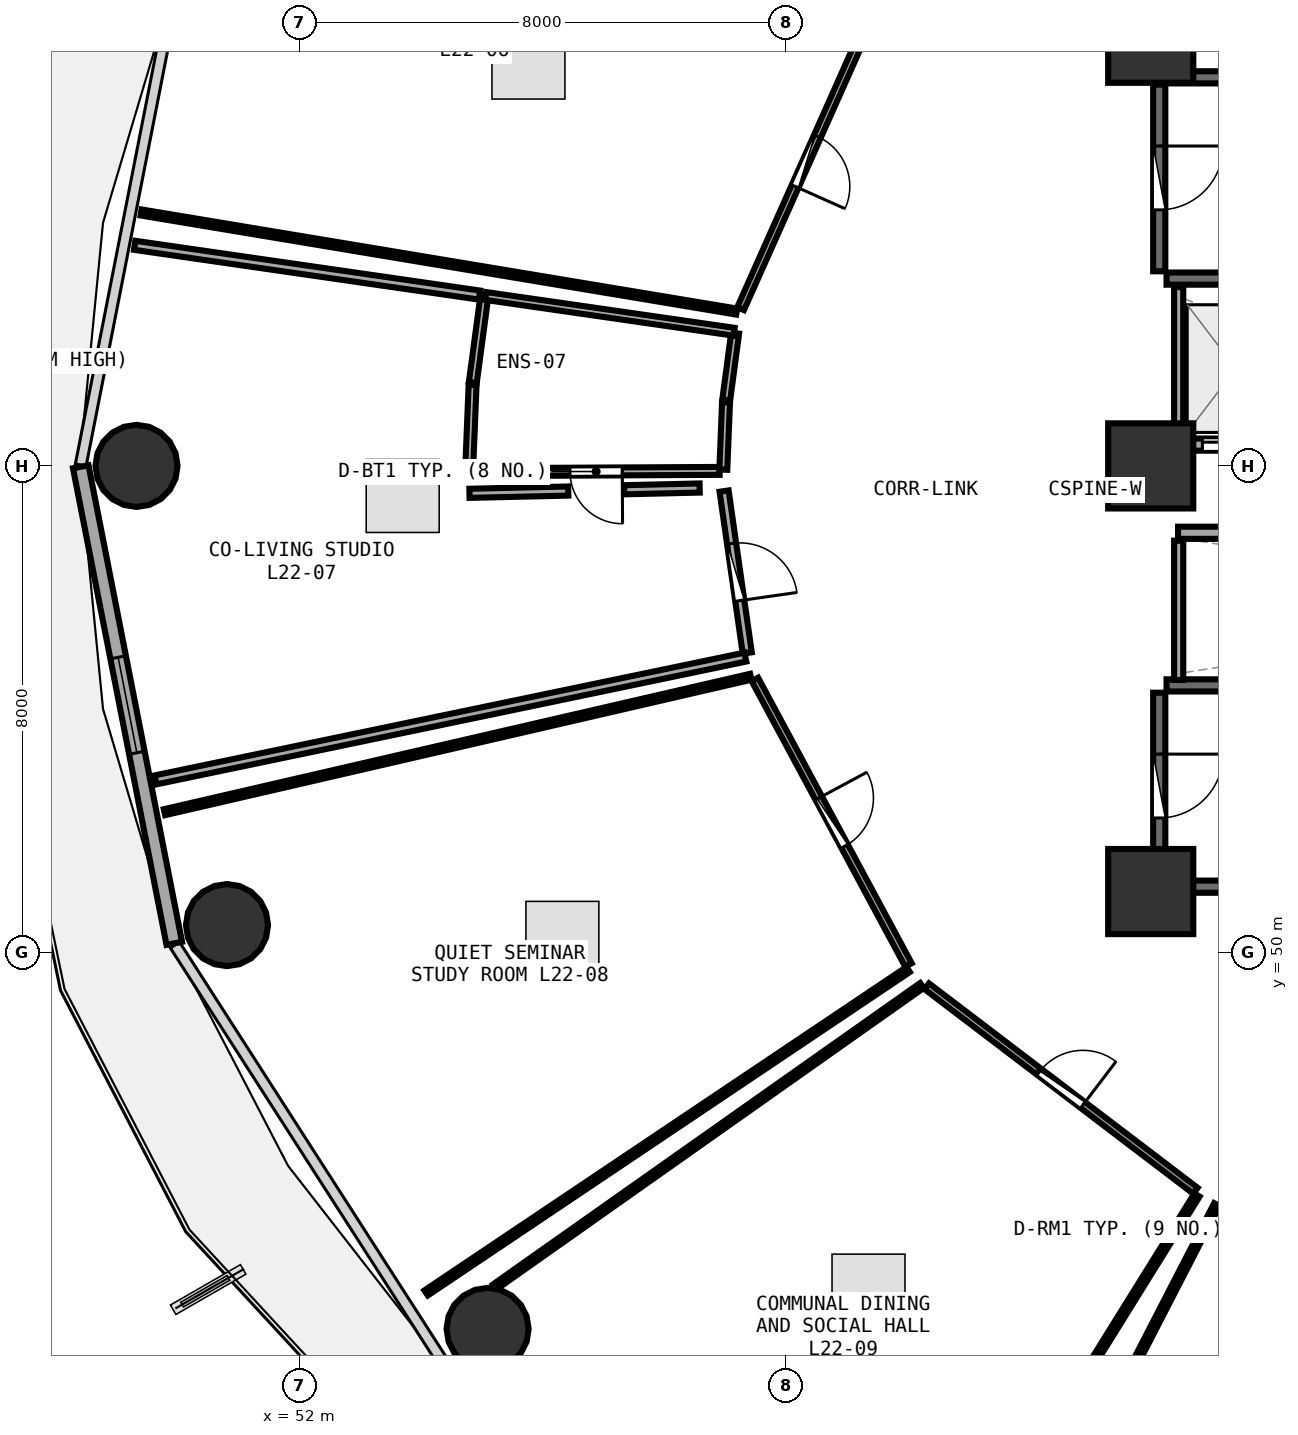
"""IFC4 building model, lengths in metres.
Left out: names, types, materials, properties, quantities, classifications, styles, units other than length and angle.
Written with IfcOpenShell. Run it as: python <this file> out.ifc"""

import sys

from ifc_helpers import new_model, si_unit, direction, frame, frame_2d, origin, origin_2d, place, context, subcontext, project, spatial, rectangle, circle, extrude, element, fill, save


model = new_model("IFC4")
c1 = context("Model", 3, precision=1e-05, world=origin(), true_north=direction((0.0, 1.0)))
c2 = subcontext(c1, "Body", "Model", "MODEL_VIEW")
j1 = project(units=[si_unit("LENGTHUNIT", "METRE"), si_unit("PLANEANGLEUNIT", "RADIAN")], contexts=[c1])
p1 = place(None, origin())
s1 = spatial("IfcSite", under=j1, at=p1, CompositionType="ELEMENT")
p2 = place(p1, origin())
s2 = spatial("IfcBuilding", under=s1, at=p2, CompositionType="ELEMENT")
p3 = place(p2, frame((0.0, 0.0, 87.6)))
s3 = spatial("IfcBuildingStorey", under=s2, at=p3, CompositionType="ELEMENT", Elevation=87.6)
for number, where, z_axis, x_axis in (
    (1, (66.0, 51.0, 0.0), (0.0, 0.0, 1.0), (1.0, 0.0, 0.0)),
    (2, (66.0, 65.0, 0.0), (0.0, 0.0, 1.0), (1.0, 0.0, 0.0)),
    (3, (66.0, 58.0, 0.0), (0.0, 0.0, 1.0), (1.0, 0.0, 0.0)),
):
    element("IfcColumn", number, at=place(p3, frame(where, z_axis=z_axis, x_axis=x_axis)), inside=s3, PredefinedType="PILASTER", context=c2, shape_type="SweptSolid", body=[
        extrude(rectangle(XDim=1.4, YDim=1.4, at=origin_2d()), origin(), (0.0, 0.0, 1.0), 3.75),
    ])
for number, where, z_axis, x_axis in (
    (4, (49.32, 58.0, 0.0), (0.0, 0.0, 1.0), (1.0, 0.0, 0.0)),
    (5, (50.808, 50.448, 0.0), (0.0, 0.0, 1.0), (1.0, 0.0, 0.0)),
    (6, (55.094, 43.807, 0.0), (0.0, 0.0, 1.0), (1.0, 0.0, 0.0)),
):
    element("IfcColumn", number, at=place(p3, frame(where, z_axis=z_axis, x_axis=x_axis)), inside=s3, PredefinedType="COLUMN", context=c2, shape_type="SweptSolid", body=[
        extrude(circle(Radius=0.675, at=origin_2d()), origin(), (0.0, 0.0, 1.0), 3.75),
    ])
p4 = place(p3, frame((48.403, 57.985, 0.0), z_axis=(0.0, 0.0, 1.0), x_axis=(0.192581843632, -0.981280914674, 0.0)))
e7 = element("IfcWall", 7, at=p4, inside=s3, PredefinedType="SOLIDWALL", context=c2, shape_type="SweptSolid", body=[
    extrude(rectangle(XDim=7.987, YDim=0.26, at=frame_2d((3.993, 0.0))), origin(), (0.0, 0.0, 1.0), 3.475),
])
p5 = place(p4, frame((3.193, 0.0, 0.85)))
e8 = element("IfcOpeningElement", 8, at=p5, cuts=e7, PredefinedType="OPENING", context=c2, shape_type="SweptSolid", body=[
    extrude(rectangle(XDim=1.6, YDim=1.45, at=frame_2d((0.8, 0.725))), frame((0.0, 0.14, 0.0), z_axis=(0.0, -1.0, 0.0), x_axis=(1.0, 0.0, 0.0)), (0.0, 0.0, 1.0), 0.28),
])
for number, where, z_axis, x_axis in (
    (9, (66.26, 61.08, 0.0), (0.0, 0.0, 1.0), (1.0, 0.0, 0.0)),
    (10, (73.42, 64.39, 0.0), (0.0, 0.0, 1.0), (-1.0, 0.0, 0.0)),
):
    element("IfcWall", number, at=place(p3, frame(where, z_axis=z_axis, x_axis=x_axis)), inside=s3, PredefinedType="SHEAR", context=c2, shape_type="SweptSolid", body=[
        extrude(rectangle(XDim=7.16, YDim=0.2, at=frame_2d((3.58, 0.0))), origin(), (0.0, 0.0, 1.0), 3.49),
    ])
p6 = place(p3, frame((66.14, 64.27, 0.0), z_axis=(0.0, 0.0, 1.0), x_axis=(0.0, -1.0, 0.0)))
e11 = element("IfcWall", 11, at=p6, inside=s3, PredefinedType="SHEAR", context=c2, shape_type="SweptSolid", body=[
    extrude(rectangle(XDim=3.07, YDim=0.2, at=frame_2d((1.535, 0.0))), origin(), (0.0, 0.0, 1.0), 3.49),
])
p7 = place(p6, frame((1.01, 0.0, 0.0)))
e12 = element("IfcOpeningElement", 12, at=p7, cuts=e11, PredefinedType="OPENING", context=c2, shape_type="SweptSolid", body=[
    extrude(rectangle(XDim=1.05, YDim=2.1, at=frame_2d((0.525, 1.05))), frame((0.0, 0.11, 0.0), z_axis=(0.0, -1.0, 0.0), x_axis=(1.0, 0.0, 0.0)), (0.0, 0.0, 1.0), 0.22),
])
for number, where, z_axis, x_axis in (
    (13, (66.26, 51.08, 0.0), (0.0, 0.0, 1.0), (1.0, 0.0, 0.0)),
    (14, (73.42, 54.39, 0.0), (0.0, 0.0, 1.0), (-1.0, 0.0, 0.0)),
):
    element("IfcWall", number, at=place(p3, frame(where, z_axis=z_axis, x_axis=x_axis)), inside=s3, PredefinedType="SHEAR", context=c2, shape_type="SweptSolid", body=[
        extrude(rectangle(XDim=7.16, YDim=0.2, at=frame_2d((3.58, 0.0))), origin(), (0.0, 0.0, 1.0), 3.49),
    ])
p8 = place(p3, frame((66.14, 54.27, 0.0), z_axis=(0.0, 0.0, 1.0), x_axis=(0.0, -1.0, 0.0)))
e15 = element("IfcWall", 15, at=p8, inside=s3, PredefinedType="SHEAR", context=c2, shape_type="SweptSolid", body=[
    extrude(rectangle(XDim=3.07, YDim=0.2, at=frame_2d((1.535, 0.0))), origin(), (0.0, 0.0, 1.0), 3.49),
])
p9 = place(p8, frame((1.01, 0.0, 0.0)))
e16 = element("IfcOpeningElement", 16, at=p9, cuts=e15, PredefinedType="OPENING", context=c2, shape_type="SweptSolid", body=[
    extrude(rectangle(XDim=1.05, YDim=2.1, at=frame_2d((0.525, 1.05))), frame((0.0, 0.11, 0.0), z_axis=(0.0, -1.0, 0.0), x_axis=(1.0, 0.0, 0.0)), (0.0, 0.0, 1.0), 0.22),
])
p10 = place(p3, frame((66.45, 58.35, 0.0), z_axis=(0.0, 0.0, 1.0), x_axis=(1.0, 0.0, 0.0)))
e17 = element("IfcWall", 17, at=p10, inside=s3, PredefinedType="SOLIDWALL", context=c2, shape_type="SweptSolid", body=[
    extrude(rectangle(XDim=6.0, YDim=0.2, at=frame_2d((3.0, 0.0))), origin(), (0.0, 0.0, 1.0), 3.48),
])
p11 = place(p10, frame((0.4, 0.0, 0.0)))
e18 = element("IfcOpeningElement", 18, at=p11, cuts=e17, PredefinedType="OPENING", context=c2, shape_type="SweptSolid", body=[
    extrude(rectangle(XDim=1.1, YDim=2.1, at=frame_2d((0.55, 1.05))), frame((0.0, 0.11, 0.0), z_axis=(0.0, -1.0, 0.0), x_axis=(1.0, 0.0, 0.0)), (0.0, 0.0, 1.0), 0.22),
])
p12 = place(p10, frame((2.4, 0.0, 0.0)))
e19 = element("IfcOpeningElement", 19, at=p12, cuts=e17, PredefinedType="OPENING", context=c2, shape_type="SweptSolid", body=[
    extrude(rectangle(XDim=1.1, YDim=2.1, at=frame_2d((0.55, 1.05))), frame((0.0, 0.11, 0.0), z_axis=(0.0, -1.0, 0.0), x_axis=(1.0, 0.0, 0.0)), (0.0, 0.0, 1.0), 0.22),
])
p13 = place(p10, frame((4.4, 0.0, 0.0)))
e20 = element("IfcOpeningElement", 20, at=p13, cuts=e17, PredefinedType="OPENING", context=c2, shape_type="SweptSolid", body=[
    extrude(rectangle(XDim=1.1, YDim=2.1, at=frame_2d((0.55, 1.05))), frame((0.0, 0.11, 0.0), z_axis=(0.0, -1.0, 0.0), x_axis=(1.0, 0.0, 0.0)), (0.0, 0.0, 1.0), 0.22),
])
p14 = place(p3, frame((66.46, 58.48, 0.0), z_axis=(0.0, 0.0, 1.0), x_axis=(0.0, 1.0, 0.0)))
e21 = element("IfcWall", 21, at=p14, inside=s3, PredefinedType="PARTITIONING", context=c2, shape_type="SweptSolid", body=[
    extrude(rectangle(XDim=2.46, YDim=0.15, at=frame_2d((1.23, 0.0))), origin(), (0.0, 0.0, 1.0), 3.48),
])
p15 = place(p3, frame((66.45, 56.9, 0.0), z_axis=(0.0, 0.0, 1.0), x_axis=(1.0, 0.0, 0.0)))
e22 = element("IfcWall", 22, at=p15, inside=s3, PredefinedType="SOLIDWALL", context=c2, shape_type="SweptSolid", body=[
    extrude(rectangle(XDim=14.4, YDim=0.2, at=frame_2d((7.2, 0.0))), origin(), (0.0, 0.0, 1.0), 3.48),
])
p16 = place(p3, frame((66.46, 54.48, 0.0), z_axis=(0.0, 0.0, 1.0), x_axis=(0.0, 1.0, 0.0)))
e23 = element("IfcWall", 23, at=p16, inside=s3, PredefinedType="PARTITIONING", context=c2, shape_type="SweptSolid", body=[
    extrude(rectangle(XDim=2.29, YDim=0.15, at=frame_2d((1.145, 0.0))), origin(), (0.0, 0.0, 1.0), 3.48),
])
p17 = place(p3, frame((61.414, 65.428, 0.0), z_axis=(0.0, 0.0, 1.0), x_axis=(-0.407078232177, -0.913393295841, 0.0)))
e24 = element("IfcWall", 24, at=p17, inside=s3, PredefinedType="PARTITIONING", context=c2, shape_type="SweptSolid", body=[
    extrude(rectangle(XDim=5.302, YDim=0.12, at=frame_2d((2.651, 0.0))), origin(), (0.0, 0.0, 1.0), 2.925),
])
p18 = place(p17, frame((2.201, 0.0, 0.0)))
e25 = element("IfcOpeningElement", 25, at=p18, cuts=e24, PredefinedType="OPENING", context=c2, shape_type="SweptSolid", body=[
    extrude(rectangle(XDim=0.9, YDim=2.08, at=frame_2d((0.45, 1.04))), frame((0.0, 0.07, 0.0), z_axis=(0.0, -1.0, 0.0), x_axis=(1.0, 0.0, 0.0)), (0.0, 0.0, 1.0), 0.14),
])
p19 = place(p3, frame((58.91, 57.918, 0.0), z_axis=(0.0, 0.0, 1.0), x_axis=(-0.999986004608, -0.005290613143, 0.0)))
e26 = element("IfcWall", 26, at=p19, inside=s3, PredefinedType="PLUMBINGWALL", context=c2, shape_type="SweptSolid", body=[
    extrude(rectangle(XDim=4.061, YDim=0.13, at=frame_2d((2.03, 0.0))), origin(), (0.0, 0.0, 1.0), 2.925),
])
p20 = place(p19, frame((1.601, 0.0, 0.0)))
e27 = element("IfcOpeningElement", 27, at=p20, cuts=e26, PredefinedType="OPENING", context=c2, shape_type="SweptSolid", body=[
    extrude(rectangle(XDim=0.86, YDim=2.05, at=frame_2d((0.43, 1.025))), frame((0.0, 0.075, 0.0), z_axis=(0.0, -1.0, 0.0), x_axis=(1.0, 0.0, 0.0)), (0.0, 0.0, 1.0), 0.15),
])
p21 = place(p3, frame((58.983, 57.586, 0.0), z_axis=(0.0, 0.0, 1.0), x_axis=(0.141700939895, -0.989909512851, 0.0)))
e28 = element("IfcWall", 28, at=p21, inside=s3, PredefinedType="PARTITIONING", context=c2, shape_type="SweptSolid", body=[
    extrude(rectangle(XDim=2.689, YDim=0.15, at=frame_2d((1.345, 0.0))), origin(), (0.0, 0.0, 1.0), 3.48),
])
p22 = place(p21, frame((0.87, 0.0, 0.0)))
e29 = element("IfcOpeningElement", 29, at=p22, cuts=e28, PredefinedType="OPENING", context=c2, shape_type="SweptSolid", body=[
    extrude(rectangle(XDim=0.95, YDim=2.08, at=frame_2d((0.475, 1.04))), frame((0.0, 0.085, 0.0), z_axis=(0.0, -1.0, 0.0), x_axis=(1.0, 0.0, 0.0)), (0.0, 0.0, 1.0), 0.17),
])
p23 = place(p3, frame((59.49, 54.488, 0.0), z_axis=(0.0, 0.0, 1.0), x_axis=(0.473630069111, -0.880723882743, 0.0)))
e30 = element("IfcWall", 30, at=p23, inside=s3, PredefinedType="PARTITIONING", context=c2, shape_type="SweptSolid", body=[
    extrude(rectangle(XDim=5.332, YDim=0.12, at=frame_2d((2.666, 0.0))), origin(), (0.0, 0.0, 1.0), 2.925),
])
p24 = place(p23, frame((2.216, 0.0, 0.0)))
e31 = element("IfcOpeningElement", 31, at=p24, cuts=e30, PredefinedType="OPENING", context=c2, shape_type="SweptSolid", body=[
    extrude(rectangle(XDim=0.9, YDim=2.08, at=frame_2d((0.45, 1.04))), frame((0.0, 0.07, 0.0), z_axis=(0.0, -1.0, 0.0), x_axis=(1.0, 0.0, 0.0)), (0.0, 0.0, 1.0), 0.14),
])
p25 = place(p3, frame((62.318, 49.442, 0.0), z_axis=(0.0, 0.0, 1.0), x_axis=(0.795762794985, -0.605608432997, 0.0)))
e32 = element("IfcWall", 32, at=p25, inside=s3, PredefinedType="PARTITIONING", context=c2, shape_type="SweptSolid", body=[
    extrude(rectangle(XDim=5.55, YDim=0.12, at=frame_2d((2.775, 0.0))), origin(), (0.0, 0.0, 1.0), 2.925),
])
p26 = place(p25, frame((2.325, 0.0, 0.0)))
e33 = element("IfcOpeningElement", 33, at=p26, cuts=e32, PredefinedType="OPENING", context=c2, shape_type="SweptSolid", body=[
    extrude(rectangle(XDim=0.9, YDim=2.08, at=frame_2d((0.45, 1.04))), frame((0.0, 0.07, 0.0), z_axis=(0.0, -1.0, 0.0), x_axis=(1.0, 0.0, 0.0)), (0.0, 0.0, 1.0), 0.14),
])
p27 = place(p3, frame((59.191, 60.538, 0.0), z_axis=(0.0, 0.0, 1.0), x_axis=(-0.986439069388, 0.16412788424, 0.0)))
e34 = element("IfcWall", 34, at=p27, inside=s3, PredefinedType="PARTITIONING", context=c2, shape_type="SweptSolid", body=[
    extrude(rectangle(XDim=9.931, YDim=0.1, at=frame_2d((4.965, 0.0))), origin(), (0.0, 0.0, 1.0), 2.975),
])
p28 = place(p3, frame((59.165, 60.183, 0.0), z_axis=(0.0, 0.0, 1.0), x_axis=(-0.132293485363, -0.991210590001, 0.0)))
e35 = element("IfcWall", 35, at=p28, inside=s3, PredefinedType="PLUMBINGWALL", context=c2, shape_type="SweptSolid", body=[
    extrude(rectangle(XDim=1.109, YDim=0.13, at=frame_2d((0.555, 0.0))), origin(), (0.0, 0.0, 1.0), 3.48),
])
p29 = place(p3, frame((59.015, 59.044, 0.0), z_axis=(0.0, 0.0, 1.0), x_axis=(-0.040144213929, -0.999193896142, 0.0)))
e36 = element("IfcWall", 36, at=p29, inside=s3, PredefinedType="PLUMBINGWALL", context=c2, shape_type="SweptSolid", body=[
    extrude(rectangle(XDim=1.107, YDim=0.13, at=frame_2d((0.553, 0.0))), origin(), (0.0, 0.0, 1.0), 2.925),
])
p30 = place(p3, frame((54.79, 57.916, 0.0), z_axis=(0.0, 0.0, 1.0), x_axis=(0.040511918217, 0.999179055266, 0.0)))
e37 = element("IfcWall", 37, at=p30, inside=s3, PredefinedType="PLUMBINGWALL", context=c2, shape_type="SweptSolid", body=[
    extrude(rectangle(XDim=1.416, YDim=0.13, at=frame_2d((0.708, 0.0))), origin(), (0.0, 0.0, 1.0), 2.925),
])
p31 = place(p3, frame((54.851, 59.371, 0.0), z_axis=(0.0, 0.0, 1.0), x_axis=(0.133008986947, 0.991114831587, 0.0)))
e38 = element("IfcWall", 38, at=p31, inside=s3, PredefinedType="PLUMBINGWALL", context=c2, shape_type="SweptSolid", body=[
    extrude(rectangle(XDim=1.419, YDim=0.13, at=frame_2d((0.709, 0.0))), origin(), (0.0, 0.0, 1.0), 3.48),
])
p32 = place(p3, frame((55.062, 60.794, 0.0), z_axis=(0.0, 0.0, 1.0), x_axis=(0.989792775484, -0.142514075094, 0.0)))
e39 = element("IfcWall", 39, at=p32, inside=s3, PredefinedType="PLUMBINGWALL", context=c2, shape_type="SweptSolid", body=[
    extrude(rectangle(XDim=4.129, YDim=0.13, at=frame_2d((2.064, 0.0))), origin(), (0.0, 0.0, 1.0), 3.175),
])
p33 = place(p3, frame((59.334, 54.856, 0.0), z_axis=(0.0, 0.0, 1.0), x_axis=(-0.979013610983, -0.203794871157, 0.0)))
e40 = element("IfcWall", 40, at=p33, inside=s3, PredefinedType="PARTITIONING", context=c2, shape_type="SweptSolid", body=[
    extrude(rectangle(XDim=9.91, YDim=0.15, at=frame_2d((4.955, 0.0))), origin(), (0.0, 0.0, 1.0), 2.975),
])
p34 = place(p3, frame((49.29, 61.627, 0.0), z_axis=(0.0, 0.0, 1.0), x_axis=(0.989748303042, -0.142822605444, 0.0)))
e41 = element("IfcWall", 41, at=p34, inside=s3, PredefinedType="PARTITIONING", context=c2, shape_type="SweptSolid", body=[
    extrude(rectangle(XDim=5.732, YDim=0.15, at=frame_2d((2.866, 0.0))), origin(), (0.0, 0.0, 1.0), 2.975),
])
p35 = place(p3, frame((54.796, 57.549, 0.0), z_axis=(0.0, 0.0, 1.0), x_axis=(0.999735829312, 0.022984159562, 0.0)))
e42 = element("IfcWall", 42, at=p35, inside=s3, PredefinedType="PARTITIONING", context=c2, shape_type="SweptSolid", body=[
    extrude(rectangle(XDim=1.625, YDim=0.15, at=frame_2d((0.812, 0.0))), origin(), (0.0, 0.0, 1.0), 3.175),
])
p36 = place(p3, frame((57.341, 57.607, 0.0), z_axis=(0.0, 0.0, 1.0), x_axis=(0.999735089114, 0.02301633322, 0.0)))
e43 = element("IfcWall", 43, at=p36, inside=s3, PredefinedType="PARTITIONING", context=c2, shape_type="SweptSolid", body=[
    extrude(rectangle(XDim=1.241, YDim=0.15, at=frame_2d((0.621, 0.0))), origin(), (0.0, 0.0, 1.0), 3.48),
])
p37 = place(p3, frame((62.011, 49.718, 0.0), z_axis=(0.0, 0.0, 1.0), x_axis=(-0.830433607217, -0.557117603388, 0.0)))
e44 = element("IfcWall", 44, at=p37, inside=s3, PredefinedType="PARTITIONING", context=c2, shape_type="SweptSolid", body=[
    extrude(rectangle(XDim=9.546, YDim=0.1, at=frame_2d((4.773, 0.0))), origin(), (0.0, 0.0, 1.0), 2.975),
])
p38 = place(p3, frame((49.78, 52.305, 0.0), z_axis=(0.0, 0.0, 1.0), x_axis=(0.9743529317, 0.225025252999, 0.0)))
e45 = element("IfcWall", 45, at=p38, inside=s3, PredefinedType="PARTITIONING", context=c2, shape_type="SweptSolid", body=[
    extrude(rectangle(XDim=9.897, YDim=0.1, at=frame_2d((4.948, 0.0))), origin(), (0.0, 0.0, 1.0), 2.975),
])
p39 = place(p3, frame((66.761, 46.01, 0.0), z_axis=(0.0, 0.0, 1.0), x_axis=(-0.528015738644, -0.849234584638, 0.0)))
e46 = element("IfcWall", 46, at=p39, inside=s3, PredefinedType="PARTITIONING", context=c2, shape_type="SweptSolid", body=[
    extrude(rectangle(XDim=8.338, YDim=0.1, at=frame_2d((4.169, 0.0))), origin(), (0.0, 0.0, 1.0), 3.175),
])
p40 = place(p3, frame((55.21, 44.498, 0.0), z_axis=(0.0, 0.0, 1.0), x_axis=(0.817133838915, 0.576447993578, 0.0)))
e47 = element("IfcWall", 47, at=p40, inside=s3, PredefinedType="PARTITIONING", context=c2, shape_type="SweptSolid", body=[
    extrude(rectangle(XDim=8.6, YDim=0.1, at=frame_2d((4.3, 0.0))), origin(), (0.0, 0.0, 1.0), 3.175),
])
p41 = place(p3, frame((65.382, 42.546, 0.0), z_axis=(0.0, 0.0, 1.0), x_axis=(0.458413879464, 0.888738834031, 0.0)))
e48 = element("IfcWall", 48, at=p41, inside=s3, PredefinedType="PARTITIONING", context=c2, shape_type="SweptSolid", body=[
    extrude(rectangle(XDim=3.72, YDim=0.1, at=frame_2d((1.86, 0.0))), origin(), (0.0, 0.0, 1.0), 3.175),
])
p42 = place(p5, origin())
e49 = element("IfcWindow", 49, at=p42, inside=s3, PartitioningType="SINGLE_PANEL", PredefinedType="WINDOW", context=c2, shape_type="SweptSolid", body=[
    extrude(rectangle(XDim=1.6, YDim=1.45, at=frame_2d((0.8, 0.725))), frame((0.0, 0.03, 0.0), z_axis=(0.0, -1.0, 0.0), x_axis=(1.0, 0.0, 0.0)), (0.0, 0.0, 1.0), 0.06),
])
fill(e8, e49)
p43 = place(p7, origin())
e50 = element("IfcDoor", 50, at=p43, inside=s3, OperationType="SINGLE_SWING_LEFT", PredefinedType="DOOR", context=c2, shape_type="SweptSolid", body=[
    extrude(rectangle(XDim=1.05, YDim=2.1, at=frame_2d((0.525, 1.05))), frame((0.0, 0.025, 0.0), z_axis=(0.0, -1.0, 0.0), x_axis=(1.0, 0.0, 0.0)), (0.0, 0.0, 1.0), 0.05),
])
fill(e12, e50)
p44 = place(p9, origin())
e51 = element("IfcDoor", 51, at=p44, inside=s3, OperationType="SINGLE_SWING_LEFT", PredefinedType="DOOR", context=c2, shape_type="SweptSolid", body=[
    extrude(rectangle(XDim=1.05, YDim=2.1, at=frame_2d((0.525, 1.05))), frame((0.0, 0.025, 0.0), z_axis=(0.0, -1.0, 0.0), x_axis=(1.0, 0.0, 0.0)), (0.0, 0.0, 1.0), 0.05),
])
fill(e16, e51)
p45 = place(p11, origin())
e52 = element("IfcDoor", 52, at=p45, inside=s3, OperationType="DOUBLE_DOOR_SLIDING", PredefinedType="DOOR", context=c2, shape_type="SweptSolid", body=[
    extrude(rectangle(XDim=1.1, YDim=2.1, at=frame_2d((0.55, 1.05))), frame((0.0, 0.025, 0.0), z_axis=(0.0, -1.0, 0.0), x_axis=(1.0, 0.0, 0.0)), (0.0, 0.0, 1.0), 0.05),
])
fill(e18, e52)
p46 = place(p18, origin())
e53 = element("IfcDoor", 53, at=p46, inside=s3, OperationType="SINGLE_SWING_RIGHT", PredefinedType="DOOR", context=c2, shape_type="SweptSolid", body=[
    extrude(rectangle(XDim=0.9, YDim=2.08, at=frame_2d((0.45, 1.04))), frame((0.0, 0.025, 0.0), z_axis=(0.0, -1.0, 0.0), x_axis=(1.0, 0.0, 0.0)), (0.0, 0.0, 1.0), 0.05),
])
fill(e25, e53)
p47 = place(p20, origin())
e54 = element("IfcDoor", 54, at=p47, inside=s3, OperationType="SINGLE_SWING_LEFT", PredefinedType="DOOR", context=c2, shape_type="SweptSolid", body=[
    extrude(rectangle(XDim=0.86, YDim=2.05, at=frame_2d((0.43, 1.025))), frame((0.0, 0.025, 0.0), z_axis=(0.0, -1.0, 0.0), x_axis=(1.0, 0.0, 0.0)), (0.0, 0.0, 1.0), 0.05),
])
fill(e27, e54)
p48 = place(p22, origin())
e55 = element("IfcDoor", 55, at=p48, inside=s3, OperationType="SINGLE_SWING_RIGHT", PredefinedType="DOOR", context=c2, shape_type="SweptSolid", body=[
    extrude(rectangle(XDim=0.95, YDim=2.08, at=frame_2d((0.475, 1.04))), frame((0.0, 0.025, 0.0), z_axis=(0.0, -1.0, 0.0), x_axis=(1.0, 0.0, 0.0)), (0.0, 0.0, 1.0), 0.05),
])
fill(e29, e55)
p49 = place(p24, origin())
e56 = element("IfcDoor", 56, at=p49, inside=s3, OperationType="SINGLE_SWING_LEFT", PredefinedType="DOOR", context=c2, shape_type="SweptSolid", body=[
    extrude(rectangle(XDim=0.9, YDim=2.08, at=frame_2d((0.45, 1.04))), frame((0.0, 0.025, 0.0), z_axis=(0.0, -1.0, 0.0), x_axis=(1.0, 0.0, 0.0)), (0.0, 0.0, 1.0), 0.05),
])
fill(e31, e56)
p50 = place(p26, origin())
e57 = element("IfcDoor", 57, at=p50, inside=s3, OperationType="SINGLE_SWING_RIGHT", PredefinedType="DOOR", context=c2, shape_type="SweptSolid", body=[
    extrude(rectangle(XDim=0.9, YDim=2.08, at=frame_2d((0.45, 1.04))), frame((0.0, 0.025, 0.0), z_axis=(0.0, -1.0, 0.0), x_axis=(1.0, 0.0, 0.0)), (0.0, 0.0, 1.0), 0.05),
])
fill(e33, e57)
save(model, sys.argv[1])
